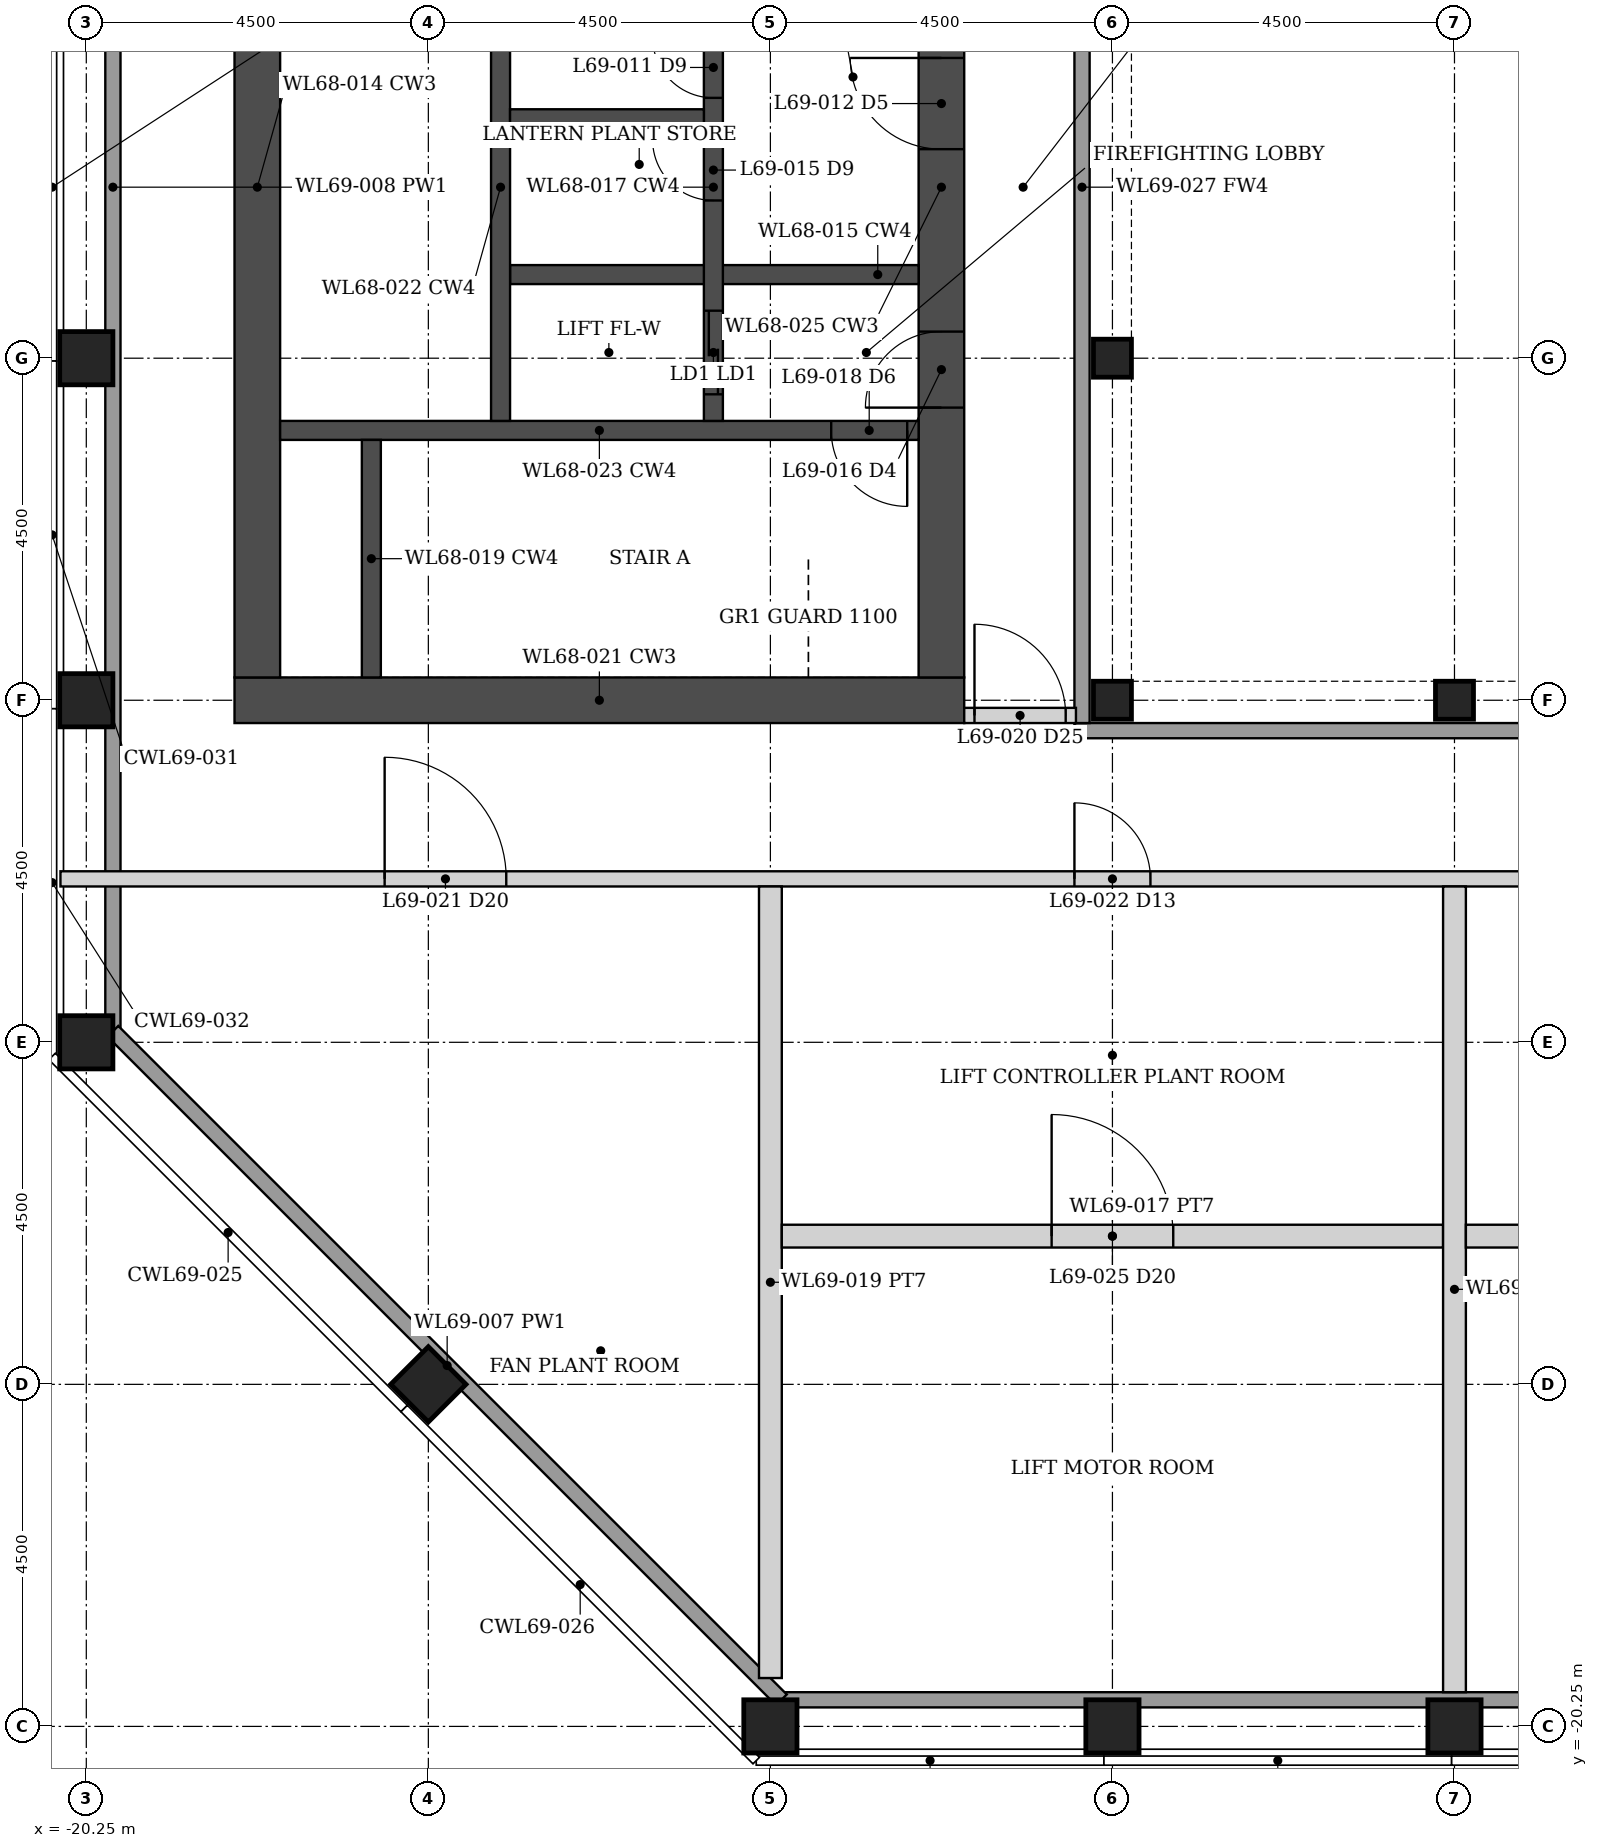
"""IFC4 building model, lengths in metres.
Left out: names, types, materials, properties, quantities, classifications, styles, units other than length and angle.
Written with IfcOpenShell. Run it as: python <this file> out.ifc"""

import sys

from ifc_helpers import new_model, si_unit, direction, frame, frame_2d, origin, origin_2d, place, context, subcontext, project, spatial, rectangle, hollow_rectangle, extrude, element, fill, save


model = new_model("IFC4")
c1 = context("Model", 3, precision=1e-05, world=origin(), true_north=direction((0.0, 1.0)))
c2 = subcontext(c1, "Body", "Model", "MODEL_VIEW")
j1 = project(units=[si_unit("LENGTHUNIT", "METRE"), si_unit("PLANEANGLEUNIT", "RADIAN")], contexts=[c1])
p1 = place(None, origin())
s1 = spatial("IfcSite", under=j1, at=p1, CompositionType="ELEMENT")
p2 = place(p1, origin())
s2 = spatial("IfcBuilding", under=s1, at=p2, CompositionType="ELEMENT")
p3 = place(p2, frame((0.0, 0.0, 268.05)))
s3 = spatial("IfcBuildingStorey", under=s2, at=p3, CompositionType="ELEMENT", Elevation=268.05)
for number, where, z_axis, x_axis in (
    (1, (-11.25, -20.25, 0.0), (0.0, 0.0, 1.0), (0.0, 1.0, 0.0)),
    (2, (-20.25, -11.25, 0.0), (0.0, 0.0, 1.0), (1.0, 0.0, 0.0)),
    (3, (-6.75, -20.25, 0.0), (0.0, 0.0, 1.0), (0.0, 1.0, 0.0)),
    (4, (-20.25, -6.75, 0.0), (0.0, 0.0, 1.0), (1.0, 0.0, 0.0)),
    (5, (-2.25, -20.25, 0.0), (0.0, 0.0, 1.0), (0.0, 1.0, 0.0)),
    (6, (-20.25, -2.25, 0.0), (0.0, 0.0, 1.0), (1.0, 0.0, 0.0)),
    (7, (-15.75, -15.75, 0.0), (0.0, 0.0, 1.0), (0.707, 0.707, 0.0)),
):
    element("IfcColumn", number, at=place(p3, frame(where, z_axis=z_axis, x_axis=x_axis)), inside=s3, PredefinedType="COLUMN", context=c2, shape_type="SweptSolid", body=[
        extrude(hollow_rectangle(XDim=0.7, YDim=0.7, WallThickness=0.035, at=origin_2d()), origin(), (0.0, 0.0, 1.0), 6.0),
    ])
for number, where, z_axis, x_axis in (
    (8, (-6.75, -6.75, 0.0), (0.0, 0.0, 1.0), (1.0, 0.0, 0.0)),
    (9, (-6.75, -2.25, 0.0), (0.0, 0.0, 1.0), (1.0, 0.0, 0.0)),
    (10, (-2.25, -6.75, 0.0), (0.0, 0.0, 1.0), (1.0, 0.0, 0.0)),
):
    element("IfcColumn", number, at=place(p3, frame(where, z_axis=z_axis, x_axis=x_axis)), inside=s3, PredefinedType="COLUMN", context=c2, shape_type="SweptSolid", body=[
        extrude(hollow_rectangle(XDim=0.5, YDim=0.5, WallThickness=0.025, at=origin_2d()), origin(), (0.0, 0.0, 1.0), 6.0),
    ])
p4 = place(p3, frame((-8.7, -6.75, 0.0), z_axis=(0.0, 0.0, 1.0), x_axis=(-1.0, 0.0, 0.0)))
e11 = element("IfcWall", 11, at=p4, inside=s3, PredefinedType="SHEAR", context=c2, shape_type="SweptSolid", body=[
    extrude(rectangle(XDim=9.6, YDim=0.6, at=frame_2d((4.8, 0.0))), origin(), (0.0, 0.0, 1.0), 6.0),
])
p5 = place(p3, frame((-9.0, -6.45, 0.0), z_axis=(0.0, 0.0, 1.0), x_axis=(0.0, 1.0, 0.0)))
e12 = element("IfcWall", 12, at=p5, inside=s3, PredefinedType="SHEAR", context=c2, shape_type="SweptSolid", body=[
    extrude(rectangle(XDim=12.9, YDim=0.6, at=frame_2d((6.45, 0.0))), origin(), (0.0, 0.0, 1.0), 6.0),
])
p6 = place(p5, frame((3.55, 0.0, 0.0)))
e13 = element("IfcOpeningElement", 13, at=p6, cuts=e12, PredefinedType="OPENING", context=c2, shape_type="SweptSolid", body=[
    extrude(rectangle(XDim=1.0, YDim=2.1, at=frame_2d((0.5, 1.05))), frame((0.0, 0.31, 0.0), z_axis=(0.0, -1.0, 0.0), x_axis=(1.0, 0.0, 0.0)), (0.0, 0.0, 1.0), 0.62),
])
p7 = place(p5, frame((6.95, 0.0, 0.0)))
e14 = element("IfcOpeningElement", 14, at=p7, cuts=e12, PredefinedType="OPENING", context=c2, shape_type="SweptSolid", body=[
    extrude(rectangle(XDim=1.2, YDim=2.1, at=frame_2d((0.6, 1.05))), frame((0.0, 0.31, 0.0), z_axis=(0.0, -1.0, 0.0), x_axis=(1.0, 0.0, 0.0)), (0.0, 0.0, 1.0), 0.62),
])
p8 = place(p5, frame((10.85, 0.0, 0.0)))
e15 = element("IfcOpeningElement", 15, at=p8, cuts=e12, PredefinedType="OPENING", context=c2, shape_type="SweptSolid", body=[
    extrude(rectangle(XDim=1.0, YDim=2.1, at=frame_2d((0.5, 1.05))), frame((0.0, 0.31, 0.0), z_axis=(0.0, -1.0, 0.0), x_axis=(1.0, 0.0, 0.0)), (0.0, 0.0, 1.0), 0.62),
])
p9 = place(p3, frame((-18.0, -6.45, 0.0), z_axis=(0.0, 0.0, 1.0), x_axis=(0.0, 1.0, 0.0)))
e16 = element("IfcWall", 16, at=p9, inside=s3, PredefinedType="SHEAR", context=c2, shape_type="SweptSolid", body=[
    extrude(rectangle(XDim=12.9, YDim=0.6, at=frame_2d((6.45, 0.0))), origin(), (0.0, 0.0, 1.0), 6.0),
])
p10 = place(p3, frame((-9.3, -3.2, 0.0), z_axis=(0.0, 0.0, 1.0), x_axis=(-1.0, 0.0, 0.0)))
e17 = element("IfcWall", 17, at=p10, inside=s3, PredefinedType="SHEAR", context=c2, shape_type="SweptSolid", body=[
    extrude(rectangle(XDim=8.4, YDim=0.25, at=frame_2d((4.2, 0.0))), origin(), (0.0, 0.0, 1.0), 6.0),
])
p11 = place(p10, frame((0.15, 0.0, 0.0)))
e18 = element("IfcOpeningElement", 18, at=p11, cuts=e17, PredefinedType="OPENING", context=c2, shape_type="SweptSolid", body=[
    extrude(rectangle(XDim=1.0, YDim=2.1, at=frame_2d((0.5, 1.05))), frame((0.0, 0.135, 0.0), z_axis=(0.0, -1.0, 0.0), x_axis=(1.0, 0.0, 0.0)), (0.0, 0.0, 1.0), 0.27),
])
p12 = place(p3, frame((-16.5, -6.45, 0.0), z_axis=(0.0, 0.0, 1.0), x_axis=(0.0, 1.0, 0.0)))
e19 = element("IfcWall", 19, at=p12, inside=s3, PredefinedType="SHEAR", context=c2, shape_type="SweptSolid", body=[
    extrude(rectangle(XDim=3.125, YDim=0.25, at=frame_2d((1.562, 0.0))), origin(), (0.0, 0.0, 1.0), 6.0),
])
p13 = place(p3, frame((-9.3, -1.15, 0.0), z_axis=(0.0, 0.0, 1.0), x_axis=(-1.0, 0.0, 0.0)))
e20 = element("IfcWall", 20, at=p13, inside=s3, PredefinedType="SHEAR", context=c2, shape_type="SweptSolid", body=[
    extrude(rectangle(XDim=5.375, YDim=0.25, at=frame_2d((2.688, 0.0))), origin(), (0.0, 0.0, 1.0), 6.0),
])
p14 = place(p3, frame((-12.0, -3.075, 0.0), z_axis=(0.0, 0.0, 1.0), x_axis=(0.0, 1.0, 0.0)))
e21 = element("IfcWall", 21, at=p14, inside=s3, PredefinedType="SHEAR", context=c2, shape_type="SweptSolid", body=[
    extrude(rectangle(XDim=6.15, YDim=0.25, at=frame_2d((3.075, 0.0))), origin(), (0.0, 0.0, 1.0), 6.0),
])
p15 = place(p14, frame((2.9, 0.0, 0.0)))
e22 = element("IfcOpeningElement", 22, at=p15, cuts=e21, PredefinedType="OPENING", context=c2, shape_type="SweptSolid", body=[
    extrude(rectangle(XDim=0.8, YDim=2.1, at=frame_2d((0.4, 1.05))), frame((0.0, 0.135, 0.0), z_axis=(0.0, -1.0, 0.0), x_axis=(1.0, 0.0, 0.0)), (0.0, 0.0, 1.0), 0.27),
])
p16 = place(p14, frame((4.25, 0.0, 0.0)))
e23 = element("IfcOpeningElement", 23, at=p16, cuts=e21, PredefinedType="OPENING", context=c2, shape_type="SweptSolid", body=[
    extrude(rectangle(XDim=0.8, YDim=2.1, at=frame_2d((0.4, 1.05))), frame((0.0, 0.135, 0.0), z_axis=(0.0, -1.0, 0.0), x_axis=(1.0, 0.0, 0.0)), (0.0, 0.0, 1.0), 0.27),
])
p17 = place(p14, frame((0.35, 0.0, 0.0)))
e24 = element("IfcOpeningElement", 24, at=p17, cuts=e21, PredefinedType="OPENING", context=c2, shape_type="SweptSolid", body=[
    extrude(rectangle(XDim=1.1, YDim=2.1, at=frame_2d((0.55, 1.05))), frame((0.0, 0.135, 0.0), z_axis=(0.0, -1.0, 0.0), x_axis=(1.0, 0.0, 0.0)), (0.0, 0.0, 1.0), 0.27),
])
p18 = place(p3, frame((-14.8, -3.075, 0.0), z_axis=(0.0, 0.0, 1.0), x_axis=(0.0, 1.0, 0.0)))
e25 = element("IfcWall", 25, at=p18, inside=s3, PredefinedType="SHEAR", context=c2, shape_type="SweptSolid", body=[
    extrude(rectangle(XDim=6.15, YDim=0.25, at=frame_2d((3.075, 0.0))), origin(), (0.0, 0.0, 1.0), 6.0),
])
p19 = place(p3, frame((-12.125, 0.9, 0.0), z_axis=(0.0, 0.0, 1.0), x_axis=(-1.0, 0.0, 0.0)))
e26 = element("IfcWall", 26, at=p19, inside=s3, PredefinedType="SHEAR", context=c2, shape_type="SweptSolid", body=[
    extrude(rectangle(XDim=2.55, YDim=0.25, at=frame_2d((1.275, 0.0))), origin(), (0.0, 0.0, 1.0), 6.0),
])
p20 = place(p3, frame((-7.25, -7.15, 0.0), z_axis=(0.0, 0.0, 1.0), x_axis=(1.0, 0.0, 0.0)))
e27 = element("IfcWall", 27, at=p20, inside=s3, PredefinedType="SOLIDWALL", context=c2, shape_type="SweptSolid", body=[
    extrude(rectangle(XDim=14.5, YDim=0.2, at=frame_2d((7.25, 0.0))), origin(), (0.0, 0.0, 1.0), 4.829),
])
p21 = place(p3, frame((-7.15, -7.05, 0.0), z_axis=(0.0, 0.0, 1.0), x_axis=(0.0, 1.0, 0.0)))
e28 = element("IfcWall", 28, at=p21, inside=s3, PredefinedType="SOLIDWALL", context=c2, shape_type="SweptSolid", body=[
    extrude(rectangle(XDim=14.1, YDim=0.2, at=frame_2d((7.05, 0.0))), origin(), (0.0, 0.0, 1.0), 4.829),
])
for number, where, z_axis, x_axis in (
    (29, (-11.105, -19.9, 6.0), (0.0, 0.0, 1.0), (1.0, 0.0, 0.0)),
    (30, (-19.9, -11.105, 6.0), (0.0, 0.0, 1.0), (0.0, 1.0, 0.0)),
):
    element("IfcWall", number, at=place(p3, frame(where, z_axis=z_axis, x_axis=x_axis)), inside=s3, PredefinedType="PARAPET", context=c2, shape_type="SweptSolid", body=[
        extrude(rectangle(XDim=22.21, YDim=0.2, at=frame_2d((11.105, 0.0))), origin(), (0.0, 0.0, 1.0), 1.1),
    ])
p22 = place(p3, frame((-19.9, -11.105, 6.0), z_axis=(0.0, 0.0, 1.0), x_axis=(0.707106781187, -0.707106781187, 0.0)))
e31 = element("IfcWall", 31, at=p22, inside=s3, PredefinedType="PARAPET", context=c2, shape_type="SweptSolid", body=[
    extrude(rectangle(XDim=12.438, YDim=0.2, at=frame_2d((6.219, 0.0))), origin(), (0.0, 0.0, 1.0), 1.1),
])
p23 = place(p3, frame((-8.7, -6.95, 0.0), z_axis=(0.0, 0.0, 1.0), x_axis=(1.0, 0.0, 0.0)))
e32 = element("IfcWall", 32, at=p23, inside=s3, PredefinedType="PARTITIONING", context=c2, shape_type="SweptSolid", body=[
    extrude(rectangle(XDim=1.47, YDim=0.2, at=frame_2d((0.735, 0.0))), origin(), (0.0, 0.0, 1.0), 4.829),
])
p24 = place(p23, frame((0.135, 0.0, 0.0)))
e33 = element("IfcOpeningElement", 33, at=p24, cuts=e32, PredefinedType="OPENING", context=c2, shape_type="SweptSolid", body=[
    extrude(rectangle(XDim=1.2, YDim=2.1, at=frame_2d((0.6, 1.05))), frame((0.0, 0.11, 0.0), z_axis=(0.0, -1.0, 0.0), x_axis=(1.0, 0.0, 0.0)), (0.0, 0.0, 1.0), 0.22),
])
p25 = place(p3, frame((-20.59, -9.1, 0.0), z_axis=(0.0, 0.0, 1.0), x_axis=(1.0, 0.0, 0.0)))
e34 = element("IfcWall", 34, at=p25, inside=s3, PredefinedType="PARTITIONING", context=c2, shape_type="SweptSolid", body=[
    extrude(rectangle(XDim=41.18, YDim=0.2, at=frame_2d((20.59, 0.0))), origin(), (0.0, 0.0, 1.0), 4.829),
])
p26 = place(p25, frame((4.265, 0.0, 0.0)))
e35 = element("IfcOpeningElement", 35, at=p26, cuts=e34, PredefinedType="OPENING", context=c2, shape_type="SweptSolid", body=[
    extrude(rectangle(XDim=1.6, YDim=2.4, at=frame_2d((0.8, 1.2))), frame((0.0, 0.11, 0.0), z_axis=(0.0, -1.0, 0.0), x_axis=(1.0, 0.0, 0.0)), (0.0, 0.0, 1.0), 0.22),
])
p27 = place(p25, frame((13.34, 0.0, 0.0)))
e36 = element("IfcOpeningElement", 36, at=p27, cuts=e34, PredefinedType="OPENING", context=c2, shape_type="SweptSolid", body=[
    extrude(rectangle(XDim=1.0, YDim=2.1, at=frame_2d((0.5, 1.05))), frame((0.0, 0.11, 0.0), z_axis=(0.0, -1.0, 0.0), x_axis=(1.0, 0.0, 0.0)), (0.0, 0.0, 1.0), 0.22),
])
p28 = place(p25, frame((22.04, 0.0, 0.0)))
e37 = element("IfcOpeningElement", 37, at=p28, cuts=e34, PredefinedType="OPENING", context=c2, shape_type="SweptSolid", body=[
    extrude(rectangle(XDim=1.6, YDim=2.4, at=frame_2d((0.8, 1.2))), frame((0.0, 0.11, 0.0), z_axis=(0.0, -1.0, 0.0), x_axis=(1.0, 0.0, 0.0)), (0.0, 0.0, 1.0), 0.22),
])
p29 = place(p25, frame((33.065, 0.0, 0.0)))
e38 = element("IfcOpeningElement", 38, at=p29, cuts=e34, PredefinedType="OPENING", context=c2, shape_type="SweptSolid", body=[
    extrude(rectangle(XDim=1.6, YDim=2.4, at=frame_2d((0.8, 1.2))), frame((0.0, 0.11, 0.0), z_axis=(0.0, -1.0, 0.0), x_axis=(1.0, 0.0, 0.0)), (0.0, 0.0, 1.0), 0.22),
])
p30 = place(p3, frame((-11.25, -19.614, 0.0), z_axis=(0.0, 0.0, 1.0), x_axis=(0.0, 1.0, 0.0)))
e39 = element("IfcWall", 39, at=p30, inside=s3, PredefinedType="PARTITIONING", context=c2, shape_type="SweptSolid", body=[
    extrude(rectangle(XDim=10.414, YDim=0.3, at=frame_2d((5.207, 0.0))), origin(), (0.0, 0.0, 1.0), 4.829),
])
p31 = place(p3, frame((-11.1, -13.8, 0.0), z_axis=(0.0, 0.0, 1.0), x_axis=(1.0, 0.0, 0.0)))
e40 = element("IfcWall", 40, at=p31, inside=s3, PredefinedType="PARTITIONING", context=c2, shape_type="SweptSolid", body=[
    extrude(rectangle(XDim=8.7, YDim=0.3, at=frame_2d((4.35, 0.0))), origin(), (0.0, 0.0, 1.0), 4.829),
])
p32 = place(p31, frame((3.55, 0.0, 0.0)))
e41 = element("IfcOpeningElement", 41, at=p32, cuts=e40, PredefinedType="OPENING", context=c2, shape_type="SweptSolid", body=[
    extrude(rectangle(XDim=1.6, YDim=2.4, at=frame_2d((0.8, 1.2))), frame((0.0, 0.16, 0.0), z_axis=(0.0, -1.0, 0.0), x_axis=(1.0, 0.0, 0.0)), (0.0, 0.0, 1.0), 0.32),
])
p33 = place(p3, frame((-2.25, -19.8, 0.0), z_axis=(0.0, 0.0, 1.0), x_axis=(0.0, 1.0, 0.0)))
e42 = element("IfcWall", 42, at=p33, inside=s3, PredefinedType="PARTITIONING", context=c2, shape_type="SweptSolid", body=[
    extrude(rectangle(XDim=10.6, YDim=0.3, at=frame_2d((5.3, 0.0))), origin(), (0.0, 0.0, 1.0), 4.829),
])
p34 = place(p3, frame((-2.1, -13.8, 0.0), z_axis=(0.0, 0.0, 1.0), x_axis=(1.0, 0.0, 0.0)))
e43 = element("IfcWall", 43, at=p34, inside=s3, PredefinedType="PARTITIONING", context=c2, shape_type="SweptSolid", body=[
    extrude(rectangle(XDim=8.7, YDim=0.3, at=frame_2d((4.35, 0.0))), origin(), (0.0, 0.0, 1.0), 4.829),
])
p35 = place(p34, frame((3.55, 0.0, 0.0)))
e44 = element("IfcOpeningElement", 44, at=p35, cuts=e43, PredefinedType="OPENING", context=c2, shape_type="SweptSolid", body=[
    extrude(rectangle(XDim=1.6, YDim=2.4, at=frame_2d((0.8, 1.2))), frame((0.0, 0.16, 0.0), z_axis=(0.0, -1.0, 0.0), x_axis=(1.0, 0.0, 0.0)), (0.0, 0.0, 1.0), 0.32),
])
p36 = place(p24, origin())
e45 = element("IfcDoor", 45, at=p36, inside=s3, OperationType="DOUBLE_DOOR_DOUBLE_SWING", PredefinedType="DOOR", context=c2, shape_type="SweptSolid", body=[
    extrude(rectangle(XDim=1.2, YDim=2.1, at=frame_2d((0.6, 1.05))), frame((0.0, 0.025, 0.0), z_axis=(0.0, -1.0, 0.0), x_axis=(1.0, 0.0, 0.0)), (0.0, 0.0, 1.0), 0.05),
])
fill(e33, e45)
p37 = place(p26, origin())
e46 = element("IfcDoor", 46, at=p37, inside=s3, OperationType="SINGLE_SWING_LEFT", PredefinedType="DOOR", context=c2, shape_type="SweptSolid", body=[
    extrude(rectangle(XDim=1.6, YDim=2.4, at=frame_2d((0.8, 1.2))), frame((0.0, 0.025, 0.0), z_axis=(0.0, -1.0, 0.0), x_axis=(1.0, 0.0, 0.0)), (0.0, 0.0, 1.0), 0.05),
])
fill(e35, e46)
p38 = place(p27, origin())
e47 = element("IfcDoor", 47, at=p38, inside=s3, OperationType="SINGLE_SWING_LEFT", PredefinedType="DOOR", context=c2, shape_type="SweptSolid", body=[
    extrude(rectangle(XDim=1.0, YDim=2.1, at=frame_2d((0.5, 1.05))), frame((0.0, 0.025, 0.0), z_axis=(0.0, -1.0, 0.0), x_axis=(1.0, 0.0, 0.0)), (0.0, 0.0, 1.0), 0.05),
])
fill(e36, e47)
p39 = place(p32, origin())
e48 = element("IfcDoor", 48, at=p39, inside=s3, OperationType="SINGLE_SWING_LEFT", PredefinedType="DOOR", context=c2, shape_type="SweptSolid", body=[
    extrude(rectangle(XDim=1.6, YDim=2.4, at=frame_2d((0.8, 1.2))), frame((0.0, 0.025, 0.0), z_axis=(0.0, -1.0, 0.0), x_axis=(1.0, 0.0, 0.0)), (0.0, 0.0, 1.0), 0.05),
])
fill(e41, e48)
p40 = place(p6, origin())
e49 = element("IfcDoor", 49, at=p40, inside=s3, OperationType="SINGLE_SWING_LEFT", PredefinedType="DOOR", context=c2, shape_type="SweptSolid", body=[
    extrude(rectangle(XDim=1.0, YDim=2.1, at=frame_2d((0.5, 1.05))), frame((0.0, 0.025, 0.0), z_axis=(0.0, -1.0, 0.0), x_axis=(1.0, 0.0, 0.0)), (0.0, 0.0, 1.0), 0.05),
])
fill(e13, e49)
p41 = place(p11, origin())
e50 = element("IfcDoor", 50, at=p41, inside=s3, OperationType="SINGLE_SWING_LEFT", PredefinedType="DOOR", context=c2, shape_type="SweptSolid", body=[
    extrude(rectangle(XDim=1.0, YDim=2.1, at=frame_2d((0.5, 1.05))), frame((0.0, 0.025, 0.0), z_axis=(0.0, -1.0, 0.0), x_axis=(1.0, 0.0, 0.0)), (0.0, 0.0, 1.0), 0.05),
])
fill(e18, e50)
p42 = place(p7, origin())
e51 = element("IfcDoor", 51, at=p42, inside=s3, OperationType="SINGLE_SWING_RIGHT", PredefinedType="DOOR", context=c2, shape_type="SweptSolid", body=[
    extrude(rectangle(XDim=1.2, YDim=2.1, at=frame_2d((0.6, 1.05))), frame((0.0, 0.025, 0.0), z_axis=(0.0, -1.0, 0.0), x_axis=(1.0, 0.0, 0.0)), (0.0, 0.0, 1.0), 0.05),
])
fill(e14, e51)
p43 = place(p15, origin())
e52 = element("IfcDoor", 52, at=p43, inside=s3, OperationType="SINGLE_SWING_RIGHT", PredefinedType="DOOR", context=c2, shape_type="SweptSolid", body=[
    extrude(rectangle(XDim=0.8, YDim=2.1, at=frame_2d((0.4, 1.05))), frame((0.0, 0.025, 0.0), z_axis=(0.0, -1.0, 0.0), x_axis=(1.0, 0.0, 0.0)), (0.0, 0.0, 1.0), 0.05),
])
fill(e22, e52)
p44 = place(p16, origin())
e53 = element("IfcDoor", 53, at=p44, inside=s3, OperationType="SINGLE_SWING_RIGHT", PredefinedType="DOOR", context=c2, shape_type="SweptSolid", body=[
    extrude(rectangle(XDim=0.8, YDim=2.1, at=frame_2d((0.4, 1.05))), frame((0.0, 0.025, 0.0), z_axis=(0.0, -1.0, 0.0), x_axis=(1.0, 0.0, 0.0)), (0.0, 0.0, 1.0), 0.05),
])
fill(e23, e53)
p45 = place(p17, origin())
e54 = element("IfcDoor", 54, at=p45, inside=s3, OperationType="DOUBLE_DOOR_SLIDING", PredefinedType="DOOR", context=c2, shape_type="SweptSolid", body=[
    extrude(rectangle(XDim=1.1, YDim=2.1, at=frame_2d((0.55, 1.05))), frame((0.0, 0.025, 0.0), z_axis=(0.0, -1.0, 0.0), x_axis=(1.0, 0.0, 0.0)), (0.0, 0.0, 1.0), 0.05),
])
fill(e24, e54)
save(model, sys.argv[1])
